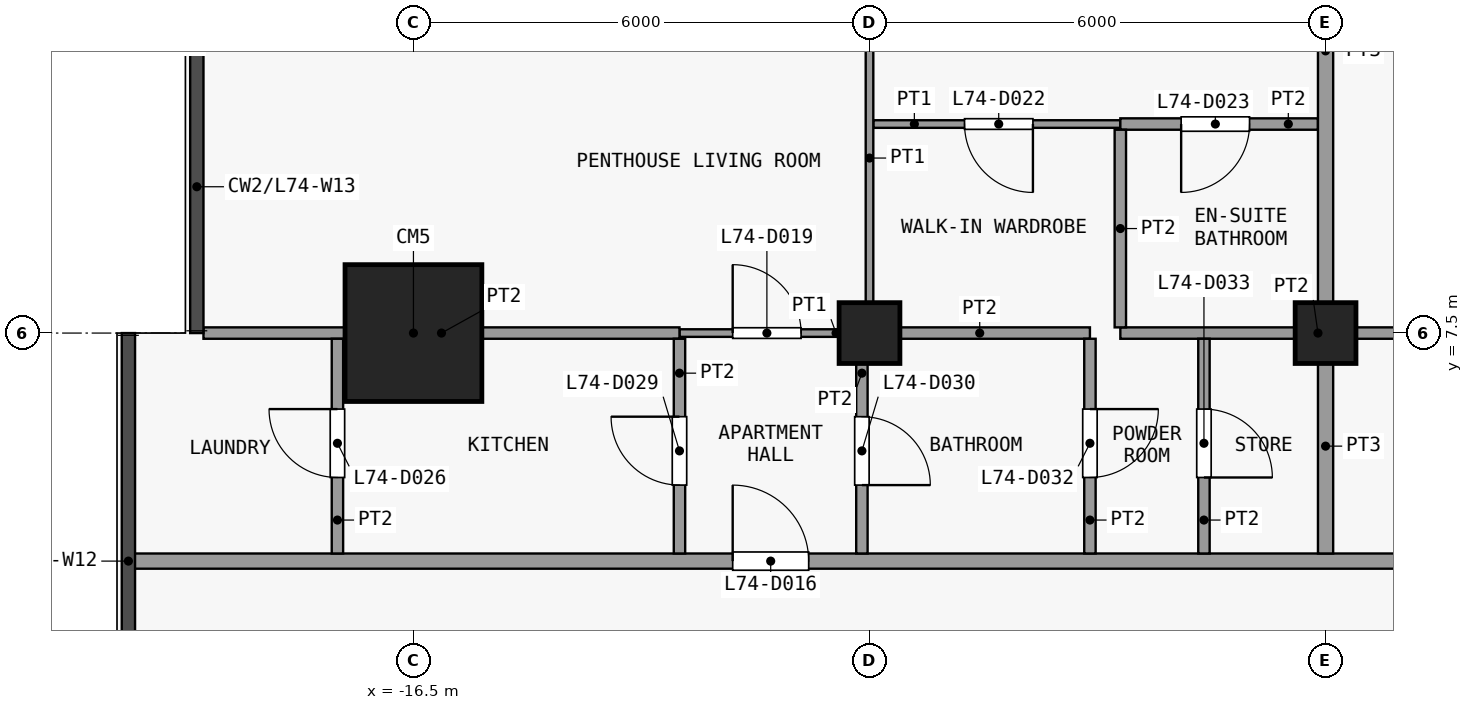
"""IFC4 building model, lengths in metres.
Left out: names, types, materials, properties, quantities, classifications, styles, units other than length and angle.
Written with IfcOpenShell. Run it as: python <this file> out.ifc"""

import sys

from ifc_helpers import new_model, si_unit, direction, frame, frame_2d, origin, origin_2d, place, context, subcontext, project, spatial, rectangle, extrude, element, fill, save


model = new_model("IFC4")
c1 = context("Model", 3, precision=1e-05, world=origin(), true_north=direction((0.0, 1.0)))
c2 = subcontext(c1, "Body", "Model", "MODEL_VIEW")
j1 = project(units=[si_unit("LENGTHUNIT", "METRE"), si_unit("PLANEANGLEUNIT", "RADIAN")], contexts=[c1])
p1 = place(None, origin())
s1 = spatial("IfcSite", under=j1, at=p1, CompositionType="ELEMENT")
p2 = place(p1, origin())
s2 = spatial("IfcBuilding", under=s1, at=p2, CompositionType="ELEMENT")
p3 = place(p2, frame((0.0, 0.0, 291.5)))
s3 = spatial("IfcBuildingStorey", under=s2, at=p3, CompositionType="ELEMENT", Elevation=291.5)
p4 = place(p3, frame((-16.5, 7.5, 0.0), z_axis=(0.0, 0.0, 1.0), x_axis=(1.0, 0.0, 0.0)))
e1 = element("IfcColumn", 1, at=p4, inside=s3, PredefinedType="COLUMN", context=c2, shape_type="SweptSolid", body=[
    extrude(rectangle(XDim=1.8, YDim=1.8, at=origin_2d()), origin(), (0.0, 0.0, 1.0), 3.6),
])
for number, where, z_axis, x_axis in (
    (2, (-10.5, 7.5, 0.0), (0.0, 0.0, 1.0), (1.0, 0.0, 0.0)),
    (3, (-4.5, 7.5, 0.0), (0.0, 0.0, 1.0), (1.0, 0.0, 0.0)),
):
    element("IfcColumn", number, at=place(p3, frame(where, z_axis=z_axis, x_axis=x_axis)), inside=s3, PredefinedType="COLUMN", context=c2, shape_type="SweptSolid", body=[
        extrude(rectangle(XDim=0.8, YDim=0.8, at=origin_2d()), origin(), (0.0, 0.0, 1.0), 3.6),
    ])
p5 = place(p3, frame((-20.25, 4.5, 0.0), z_axis=(0.0, 0.0, 1.0), x_axis=(1.0, 0.0, 0.0)))
e4 = element("IfcWall", 4, at=p5, inside=s3, PredefinedType="PARTITIONING", context=c2, shape_type="SweptSolid", body=[
    extrude(rectangle(XDim=39.6, YDim=0.2, at=frame_2d((19.8, 0.0))), origin(), (0.0, 0.0, 1.0), 3.3),
])
p6 = place(p5, frame((7.95, 0.0, 0.0)))
e5 = element("IfcOpeningElement", 5, at=p6, cuts=e4, PredefinedType="OPENING", context=c2, shape_type="SweptSolid", body=[
    extrude(rectangle(XDim=1.0, YDim=2.1, at=frame_2d((0.5, 1.05))), frame((0.0, 0.11, 0.0), z_axis=(0.0, -1.0, 0.0), x_axis=(1.0, 0.0, 0.0)), (0.0, 0.0, 1.0), 0.22),
])
p7 = place(p5, frame((18.95, 0.0, 0.0)))
e6 = element("IfcOpeningElement", 6, at=p7, cuts=e4, PredefinedType="OPENING", context=c2, shape_type="SweptSolid", body=[
    extrude(rectangle(XDim=1.0, YDim=2.1, at=frame_2d((0.5, 1.05))), frame((0.0, 0.11, 0.0), z_axis=(0.0, -1.0, 0.0), x_axis=(1.0, 0.0, 0.0)), (0.0, 0.0, 1.0), 0.22),
])
p8 = place(p5, frame((33.95, 0.0, 0.0)))
e7 = element("IfcOpeningElement", 7, at=p8, cuts=e4, PredefinedType="OPENING", context=c2, shape_type="SweptSolid", body=[
    extrude(rectangle(XDim=1.0, YDim=2.1, at=frame_2d((0.5, 1.05))), frame((0.0, 0.11, 0.0), z_axis=(0.0, -1.0, 0.0), x_axis=(1.0, 0.0, 0.0)), (0.0, 0.0, 1.0), 0.22),
])
p9 = place(p3, frame((-13.0, 7.5, 0.0), z_axis=(0.0, 0.0, 1.0), x_axis=(1.0, 0.0, 0.0)))
e8 = element("IfcWall", 8, at=p9, inside=s3, PredefinedType="PARTITIONING", context=c2, shape_type="SweptSolid", body=[
    extrude(rectangle(XDim=2.4, YDim=0.1, at=frame_2d((1.2, 0.0))), origin(), (0.0, 0.0, 1.0), 3.3),
])
p10 = place(p9, frame((0.7, 0.0, 0.0)))
e9 = element("IfcOpeningElement", 9, at=p10, cuts=e8, PredefinedType="OPENING", context=c2, shape_type="SweptSolid", body=[
    extrude(rectangle(XDim=0.9, YDim=2.1, at=frame_2d((0.45, 1.05))), frame((0.0, 0.06, 0.0), z_axis=(0.0, -1.0, 0.0), x_axis=(1.0, 0.0, 0.0)), (0.0, 0.0, 1.0), 0.12),
])
p11 = place(p3, frame((-19.262, 7.5, 0.0), z_axis=(0.0, 0.0, 1.0), x_axis=(1.0, 0.0, 0.0)))
e10 = element("IfcWall", 10, at=p11, inside=s3, PredefinedType="PARTITIONING", context=c2, shape_type="SweptSolid", body=[
    extrude(rectangle(XDim=6.262, YDim=0.15, at=frame_2d((3.131, 0.0))), origin(), (0.0, 0.0, 1.0), 3.3),
])
p12 = place(p3, frame((-10.5, 7.5, 0.0), z_axis=(0.0, 0.0, 1.0), x_axis=(1.0, 0.0, 0.0)))
e11 = element("IfcWall", 11, at=p12, inside=s3, PredefinedType="PARTITIONING", context=c2, shape_type="SweptSolid", body=[
    extrude(rectangle(XDim=2.9, YDim=0.15, at=frame_2d((1.45, 0.0))), origin(), (0.0, 0.0, 1.0), 3.3),
])
p13 = place(p3, frame((-7.2, 7.5, 0.0), z_axis=(0.0, 0.0, 1.0), x_axis=(1.0, 0.0, 0.0)))
e12 = element("IfcWall", 12, at=p13, inside=s3, PredefinedType="PARTITIONING", context=c2, shape_type="SweptSolid", body=[
    extrude(rectangle(XDim=5.2, YDim=0.15, at=frame_2d((2.6, 0.0))), origin(), (0.0, 0.0, 1.0), 3.3),
])
p14 = place(p3, frame((-10.45, 10.25, 0.0), z_axis=(0.0, 0.0, 1.0), x_axis=(1.0, 0.0, 0.0)))
e13 = element("IfcWall", 13, at=p14, inside=s3, PredefinedType="PARTITIONING", context=c2, shape_type="SweptSolid", body=[
    extrude(rectangle(XDim=3.25, YDim=0.1, at=frame_2d((1.625, 0.0))), origin(), (0.0, 0.0, 1.0), 3.3),
])
p15 = place(p14, frame((1.2, 0.0, 0.0)))
e14 = element("IfcOpeningElement", 14, at=p15, cuts=e13, PredefinedType="OPENING", context=c2, shape_type="SweptSolid", body=[
    extrude(rectangle(XDim=0.9, YDim=2.1, at=frame_2d((0.45, 1.05))), frame((0.0, 0.06, 0.0), z_axis=(0.0, -1.0, 0.0), x_axis=(1.0, 0.0, 0.0)), (0.0, 0.0, 1.0), 0.12),
])
p16 = place(p3, frame((-7.2, 10.25, 0.0), z_axis=(0.0, 0.0, 1.0), x_axis=(1.0, 0.0, 0.0)))
e15 = element("IfcWall", 15, at=p16, inside=s3, PredefinedType="PARTITIONING", context=c2, shape_type="SweptSolid", body=[
    extrude(rectangle(XDim=2.6, YDim=0.15, at=frame_2d((1.3, 0.0))), origin(), (0.0, 0.0, 1.0), 3.3),
])
p17 = place(p16, frame((0.8, 0.0, 0.0)))
e16 = element("IfcOpeningElement", 16, at=p17, cuts=e15, PredefinedType="OPENING", context=c2, shape_type="SweptSolid", body=[
    extrude(rectangle(XDim=0.9, YDim=2.1, at=frame_2d((0.45, 1.05))), frame((0.0, 0.085, 0.0), z_axis=(0.0, -1.0, 0.0), x_axis=(1.0, 0.0, 0.0)), (0.0, 0.0, 1.0), 0.17),
])
p18 = place(p3, frame((-17.5, 4.6, 0.0), z_axis=(0.0, 0.0, 1.0), x_axis=(0.0, 1.0, 0.0)))
e17 = element("IfcWall", 17, at=p18, inside=s3, PredefinedType="PARTITIONING", context=c2, shape_type="SweptSolid", body=[
    extrude(rectangle(XDim=2.825, YDim=0.15, at=frame_2d((1.413, 0.0))), origin(), (0.0, 0.0, 1.0), 3.3),
])
p19 = place(p18, frame((1.0, 0.0, 0.0)))
e18 = element("IfcOpeningElement", 18, at=p19, cuts=e17, PredefinedType="OPENING", context=c2, shape_type="SweptSolid", body=[
    extrude(rectangle(XDim=0.9, YDim=2.1, at=frame_2d((0.45, 1.05))), frame((0.0, 0.085, 0.0), z_axis=(0.0, -1.0, 0.0), x_axis=(1.0, 0.0, 0.0)), (0.0, 0.0, 1.0), 0.17),
])
p20 = place(p3, frame((-13.0, 4.6, 0.0), z_axis=(0.0, 0.0, 1.0), x_axis=(0.0, 1.0, 0.0)))
e19 = element("IfcWall", 19, at=p20, inside=s3, PredefinedType="PARTITIONING", context=c2, shape_type="SweptSolid", body=[
    extrude(rectangle(XDim=2.825, YDim=0.15, at=frame_2d((1.413, 0.0))), origin(), (0.0, 0.0, 1.0), 3.3),
])
p21 = place(p20, frame((0.9, 0.0, 0.0)))
e20 = element("IfcOpeningElement", 20, at=p21, cuts=e19, PredefinedType="OPENING", context=c2, shape_type="SweptSolid", body=[
    extrude(rectangle(XDim=0.9, YDim=2.1, at=frame_2d((0.45, 1.05))), frame((0.0, 0.085, 0.0), z_axis=(0.0, -1.0, 0.0), x_axis=(1.0, 0.0, 0.0)), (0.0, 0.0, 1.0), 0.17),
])
p22 = place(p3, frame((-10.6, 4.6, 0.0), z_axis=(0.0, 0.0, 1.0), x_axis=(0.0, 1.0, 0.0)))
e21 = element("IfcWall", 21, at=p22, inside=s3, PredefinedType="PARTITIONING", context=c2, shape_type="SweptSolid", body=[
    extrude(rectangle(XDim=2.825, YDim=0.15, at=frame_2d((1.413, 0.0))), origin(), (0.0, 0.0, 1.0), 3.3),
])
p23 = place(p22, frame((0.9, 0.0, 0.0)))
e22 = element("IfcOpeningElement", 22, at=p23, cuts=e21, PredefinedType="OPENING", context=c2, shape_type="SweptSolid", body=[
    extrude(rectangle(XDim=0.9, YDim=2.1, at=frame_2d((0.45, 1.05))), frame((0.0, 0.085, 0.0), z_axis=(0.0, -1.0, 0.0), x_axis=(1.0, 0.0, 0.0)), (0.0, 0.0, 1.0), 0.17),
])
p24 = place(p3, frame((-10.5, 7.575, 0.0), z_axis=(0.0, 0.0, 1.0), x_axis=(0.0, 1.0, 0.0)))
e23 = element("IfcWall", 23, at=p24, inside=s3, PredefinedType="PARTITIONING", context=c2, shape_type="SweptSolid", body=[
    extrude(rectangle(XDim=7.275, YDim=0.1, at=frame_2d((3.638, 0.0))), origin(), (0.0, 0.0, 1.0), 3.3),
])
p25 = place(p24, frame((4.575, 0.0, 0.0)))
e24 = element("IfcOpeningElement", 24, at=p25, cuts=e23, PredefinedType="OPENING", context=c2, shape_type="SweptSolid", body=[
    extrude(rectangle(XDim=0.9, YDim=2.1, at=frame_2d((0.45, 1.05))), frame((0.0, 0.06, 0.0), z_axis=(0.0, -1.0, 0.0), x_axis=(1.0, 0.0, 0.0)), (0.0, 0.0, 1.0), 0.12),
])
p26 = place(p3, frame((-7.6, 4.6, 0.0), z_axis=(0.0, 0.0, 1.0), x_axis=(0.0, 1.0, 0.0)))
e25 = element("IfcWall", 25, at=p26, inside=s3, PredefinedType="PARTITIONING", context=c2, shape_type="SweptSolid", body=[
    extrude(rectangle(XDim=2.825, YDim=0.15, at=frame_2d((1.413, 0.0))), origin(), (0.0, 0.0, 1.0), 3.3),
])
p27 = place(p26, frame((1.0, 0.0, 0.0)))
e26 = element("IfcOpeningElement", 26, at=p27, cuts=e25, PredefinedType="OPENING", context=c2, shape_type="SweptSolid", body=[
    extrude(rectangle(XDim=0.9, YDim=2.1, at=frame_2d((0.45, 1.05))), frame((0.0, 0.085, 0.0), z_axis=(0.0, -1.0, 0.0), x_axis=(1.0, 0.0, 0.0)), (0.0, 0.0, 1.0), 0.17),
])
p28 = place(p3, frame((-7.2, 7.575, 0.0), z_axis=(0.0, 0.0, 1.0), x_axis=(0.0, 1.0, 0.0)))
e27 = element("IfcWall", 27, at=p28, inside=s3, PredefinedType="PARTITIONING", context=c2, shape_type="SweptSolid", body=[
    extrude(rectangle(XDim=2.6, YDim=0.15, at=frame_2d((1.3, 0.0))), origin(), (0.0, 0.0, 1.0), 3.3),
])
p29 = place(p3, frame((-6.1, 4.6, 0.0), z_axis=(0.0, 0.0, 1.0), x_axis=(0.0, 1.0, 0.0)))
e28 = element("IfcWall", 28, at=p29, inside=s3, PredefinedType="PARTITIONING", context=c2, shape_type="SweptSolid", body=[
    extrude(rectangle(XDim=2.825, YDim=0.15, at=frame_2d((1.413, 0.0))), origin(), (0.0, 0.0, 1.0), 3.3),
])
p30 = place(p29, frame((1.0, 0.0, 0.0)))
e29 = element("IfcOpeningElement", 29, at=p30, cuts=e28, PredefinedType="OPENING", context=c2, shape_type="SweptSolid", body=[
    extrude(rectangle(XDim=0.9, YDim=2.1, at=frame_2d((0.45, 1.05))), frame((0.0, 0.085, 0.0), z_axis=(0.0, -1.0, 0.0), x_axis=(1.0, 0.0, 0.0)), (0.0, 0.0, 1.0), 0.17),
])
p31 = place(p3, frame((-4.5, 4.6, 0.0), z_axis=(0.0, 0.0, 1.0), x_axis=(0.0, 1.0, 0.0)))
e30 = element("IfcWall", 30, at=p31, inside=s3, PredefinedType="PARTITIONING", context=c2, shape_type="SweptSolid", body=[
    extrude(rectangle(XDim=2.825, YDim=0.2, at=frame_2d((1.413, 0.0))), origin(), (0.0, 0.0, 1.0), 3.3),
])
p32 = place(p3, frame((-4.5, 7.575, 0.0), z_axis=(0.0, 0.0, 1.0), x_axis=(0.0, 1.0, 0.0)))
e31 = element("IfcWall", 31, at=p32, inside=s3, PredefinedType="PARTITIONING", context=c2, shape_type="SweptSolid", body=[
    extrude(rectangle(XDim=7.275, YDim=0.2, at=frame_2d((3.638, 0.0))), origin(), (0.0, 0.0, 1.0), 3.3),
])
p33 = place(p6, origin())
e32 = element("IfcDoor", 32, at=p33, inside=s3, OperationType="SINGLE_SWING_RIGHT", PredefinedType="DOOR", context=c2, shape_type="SweptSolid", body=[
    extrude(rectangle(XDim=1.0, YDim=2.1, at=frame_2d((0.5, 1.05))), frame((0.0, 0.025, 0.0), z_axis=(0.0, -1.0, 0.0), x_axis=(1.0, 0.0, 0.0)), (0.0, 0.0, 1.0), 0.05),
])
fill(e5, e32)
p34 = place(p10, origin())
e33 = element("IfcDoor", 33, at=p34, inside=s3, OperationType="SINGLE_SWING_RIGHT", PredefinedType="DOOR", context=c2, shape_type="SweptSolid", body=[
    extrude(rectangle(XDim=0.9, YDim=2.1, at=frame_2d((0.45, 1.05))), frame((0.0, 0.025, 0.0), z_axis=(0.0, -1.0, 0.0), x_axis=(1.0, 0.0, 0.0)), (0.0, 0.0, 1.0), 0.05),
])
fill(e9, e33)
p35 = place(p15, origin())
e34 = element("IfcDoor", 34, at=p35, inside=s3, OperationType="SINGLE_SWING_RIGHT", PredefinedType="DOOR", context=c2, shape_type="SweptSolid", body=[
    extrude(rectangle(XDim=0.9, YDim=2.1, at=frame_2d((0.45, 1.05))), frame((0.0, 0.025, 0.0), z_axis=(0.0, -1.0, 0.0), x_axis=(1.0, 0.0, 0.0)), (0.0, 0.0, 1.0), 0.05),
])
fill(e14, e34)
p36 = place(p17, origin())
e35 = element("IfcDoor", 35, at=p36, inside=s3, OperationType="SINGLE_SWING_LEFT", PredefinedType="DOOR", context=c2, shape_type="SweptSolid", body=[
    extrude(rectangle(XDim=0.9, YDim=2.1, at=frame_2d((0.45, 1.05))), frame((0.0, 0.025, 0.0), z_axis=(0.0, -1.0, 0.0), x_axis=(1.0, 0.0, 0.0)), (0.0, 0.0, 1.0), 0.05),
])
fill(e16, e35)
p37 = place(p19, origin())
e36 = element("IfcDoor", 36, at=p37, inside=s3, OperationType="SINGLE_SWING_LEFT", PredefinedType="DOOR", context=c2, shape_type="SweptSolid", body=[
    extrude(rectangle(XDim=0.9, YDim=2.1, at=frame_2d((0.45, 1.05))), frame((0.0, 0.025, 0.0), z_axis=(0.0, -1.0, 0.0), x_axis=(1.0, 0.0, 0.0)), (0.0, 0.0, 1.0), 0.05),
])
fill(e18, e36)
p38 = place(p21, origin())
e37 = element("IfcDoor", 37, at=p38, inside=s3, OperationType="SINGLE_SWING_LEFT", PredefinedType="DOOR", context=c2, shape_type="SweptSolid", body=[
    extrude(rectangle(XDim=0.9, YDim=2.1, at=frame_2d((0.45, 1.05))), frame((0.0, 0.025, 0.0), z_axis=(0.0, -1.0, 0.0), x_axis=(1.0, 0.0, 0.0)), (0.0, 0.0, 1.0), 0.05),
])
fill(e20, e37)
p39 = place(p23, origin())
e38 = element("IfcDoor", 38, at=p39, inside=s3, OperationType="SINGLE_SWING_LEFT", PredefinedType="DOOR", context=c2, shape_type="SweptSolid", body=[
    extrude(rectangle(XDim=0.9, YDim=2.1, at=frame_2d((0.45, 1.05))), frame((0.0, 0.025, 0.0), z_axis=(0.0, -1.0, 0.0), x_axis=(1.0, 0.0, 0.0)), (0.0, 0.0, 1.0), 0.05),
])
fill(e22, e38)
p40 = place(p27, origin())
e39 = element("IfcDoor", 39, at=p40, inside=s3, OperationType="SINGLE_SWING_RIGHT", PredefinedType="DOOR", context=c2, shape_type="SweptSolid", body=[
    extrude(rectangle(XDim=0.9, YDim=2.1, at=frame_2d((0.45, 1.05))), frame((0.0, 0.025, 0.0), z_axis=(0.0, -1.0, 0.0), x_axis=(1.0, 0.0, 0.0)), (0.0, 0.0, 1.0), 0.05),
])
fill(e26, e39)
p41 = place(p30, origin())
e40 = element("IfcDoor", 40, at=p41, inside=s3, OperationType="SINGLE_SWING_LEFT", PredefinedType="DOOR", context=c2, shape_type="SweptSolid", body=[
    extrude(rectangle(XDim=0.9, YDim=2.1, at=frame_2d((0.45, 1.05))), frame((0.0, 0.025, 0.0), z_axis=(0.0, -1.0, 0.0), x_axis=(1.0, 0.0, 0.0)), (0.0, 0.0, 1.0), 0.05),
])
fill(e29, e40)
save(model, sys.argv[1])
